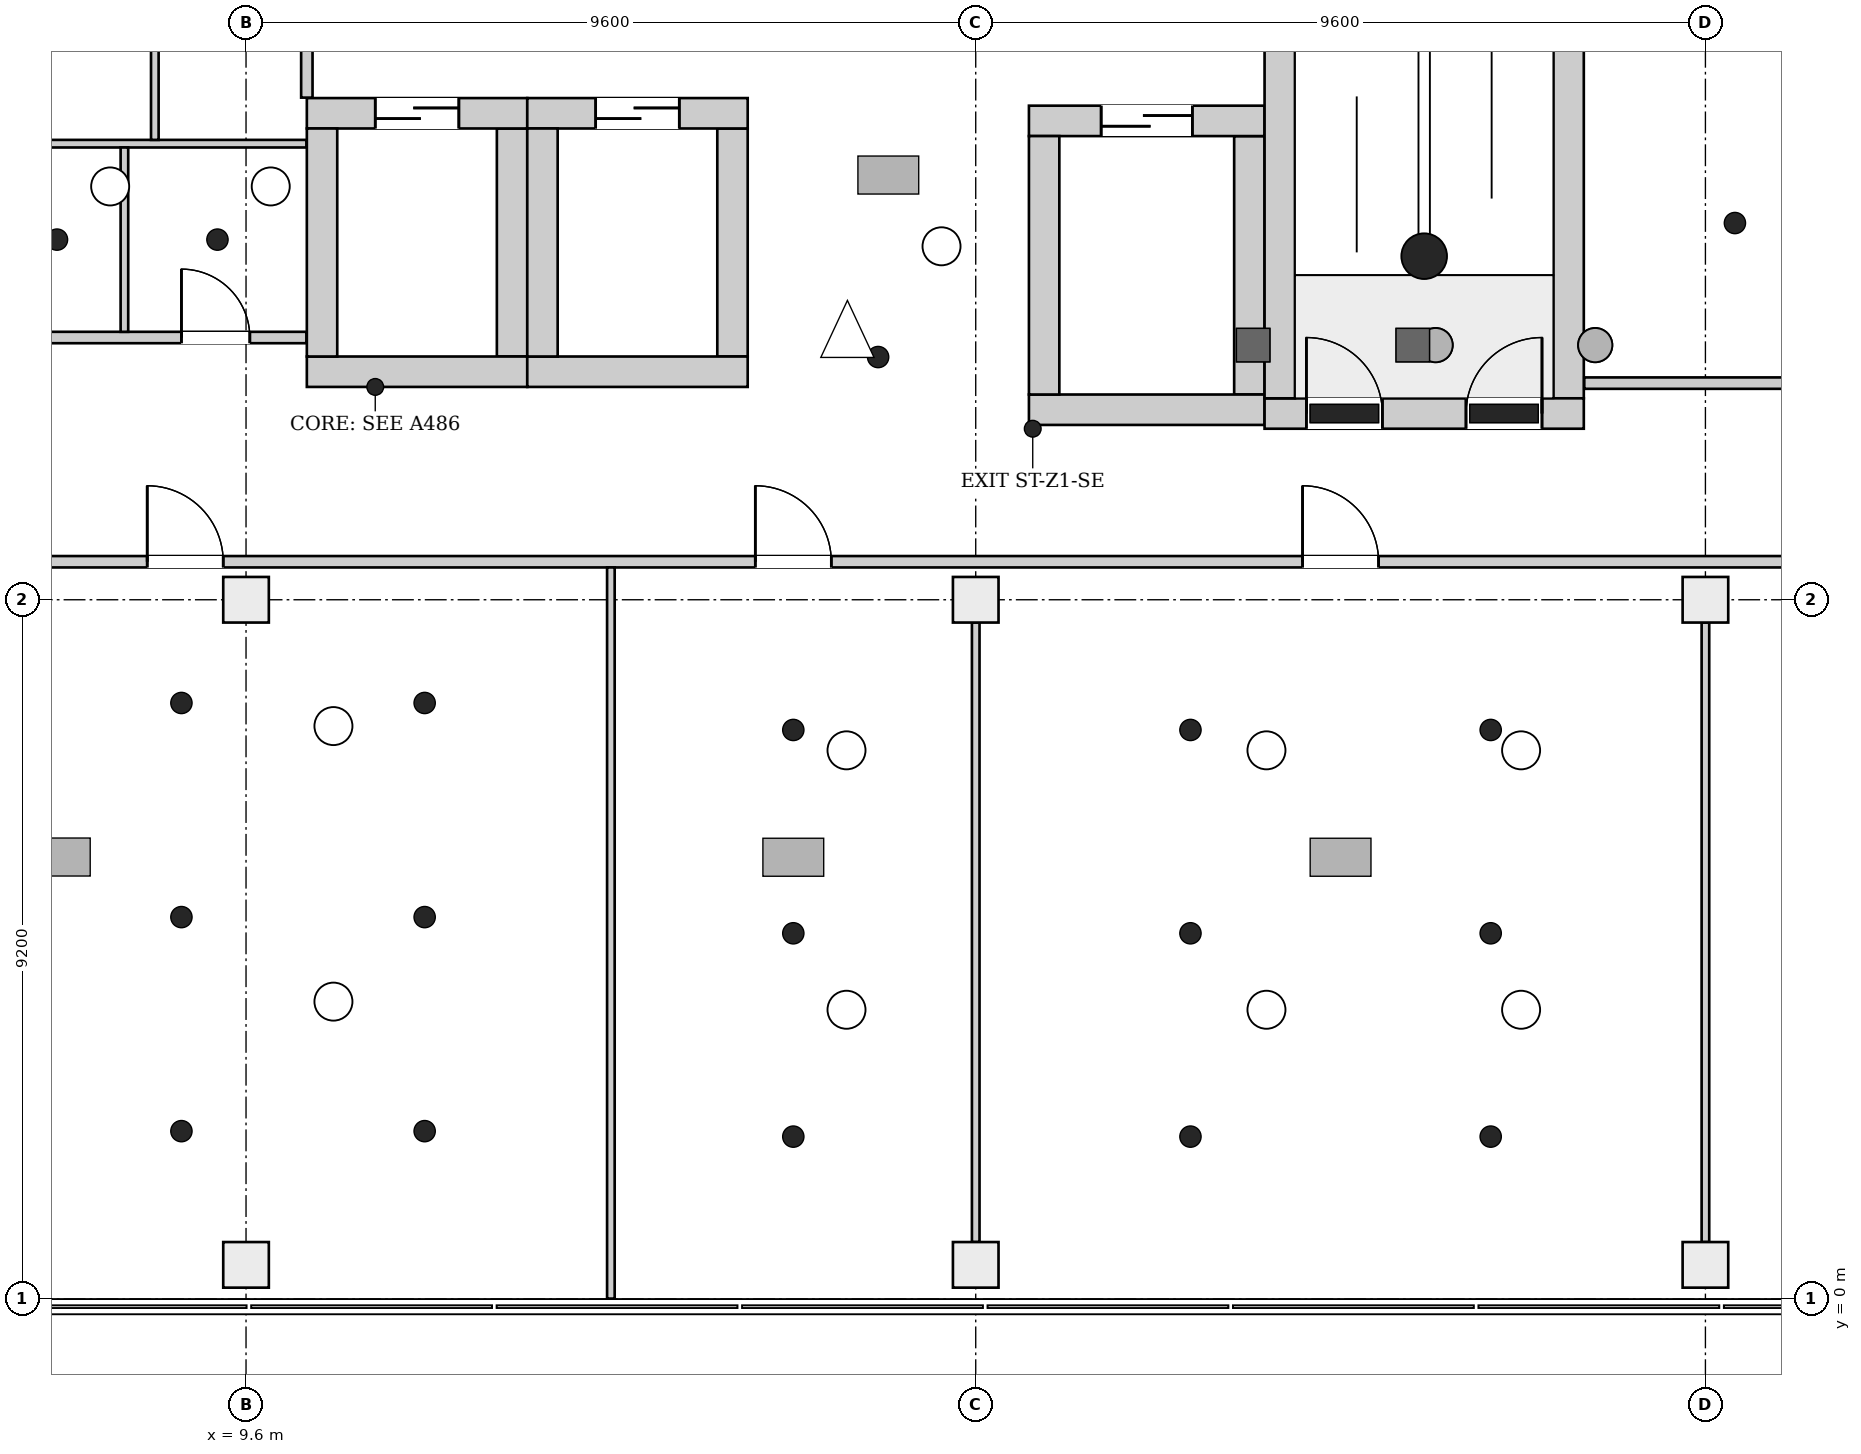
"""IFC4 building model, lengths in metres.
Left out: names, types, materials, properties, quantities, classifications, styles, units other than length and angle.
Written with IfcOpenShell. Run it as: python <this file> out.ifc"""

import sys

from ifc_helpers import new_model, si_unit, direction, frame, frame_2d, origin, origin_2d, place, context, subcontext, project, spatial, rectangle, extrude, element, fill, save


model = new_model("IFC4")
c1 = context("Model", 3, precision=1e-05, world=origin(), true_north=direction((0.0, 1.0)))
c2 = subcontext(c1, "Body", "Model", "MODEL_VIEW")
j1 = project(units=[si_unit("LENGTHUNIT", "METRE"), si_unit("PLANEANGLEUNIT", "RADIAN")], contexts=[c1])
p1 = place(None, origin())
s1 = spatial("IfcSite", under=j1, at=p1, CompositionType="ELEMENT")
p2 = place(p1, origin())
s2 = spatial("IfcBuilding", under=s1, at=p2, CompositionType="ELEMENT")
p3 = place(p2, frame((0.0, 0.0, 73.9)))
s3 = spatial("IfcBuildingStorey", under=s2, at=p3, CompositionType="ELEMENT", Elevation=73.9)
p4 = place(p3, frame((23.0, 11.65, 0.0), z_axis=(0.0, 0.0, 1.0), x_axis=(1.0, 0.0, 0.0)))
e1 = element("IfcWall", 1, at=p4, inside=s3, PredefinedType="SHEAR", context=c2, shape_type="SweptSolid", body=[
    extrude(rectangle(XDim=4.2, YDim=0.4, at=frame_2d((2.1, 0.0))), origin(), (0.0, 0.0, 1.0), 4.2),
])
p5 = place(p4, frame((0.55, 0.0, 0.0)))
e2 = element("IfcOpeningElement", 2, at=p5, cuts=e1, PredefinedType="OPENING", context=c2, shape_type="SweptSolid", body=[
    extrude(rectangle(XDim=1.0, YDim=2.1, at=frame_2d((0.5, 1.05))), frame((0.0, 0.21, 0.0), z_axis=(0.0, -1.0, 0.0), x_axis=(1.0, 0.0, 0.0)), (0.0, 0.0, 1.0), 0.42),
])
p6 = place(p4, frame((2.65, 0.0, 0.0)))
e3 = element("IfcOpeningElement", 3, at=p6, cuts=e1, PredefinedType="OPENING", context=c2, shape_type="SweptSolid", body=[
    extrude(rectangle(XDim=1.0, YDim=2.1, at=frame_2d((0.5, 1.05))), frame((0.0, 0.21, 0.0), z_axis=(0.0, -1.0, 0.0), x_axis=(1.0, 0.0, 0.0)), (0.0, 0.0, 1.0), 0.42),
])
for number, where, z_axis, x_axis in (
    (4, (23.2, 11.85, 0.0), (0.0, 0.0, 1.0), (0.0, 1.0, 0.0)),
    (5, (27.0, 11.85, 0.0), (0.0, 0.0, 1.0), (0.0, 1.0, 0.0)),
):
    element("IfcWall", number, at=place(p3, frame(where, z_axis=z_axis, x_axis=x_axis)), inside=s3, PredefinedType="SHEAR", context=c2, shape_type="SweptSolid", body=[
        extrude(rectangle(XDim=6.6, YDim=0.4, at=frame_2d((3.3, 0.0))), origin(), (0.0, 0.0, 1.0), 4.2),
    ])
p7 = place(p3, frame((10.4, 12.2, 0.0), z_axis=(0.0, 0.0, 1.0), x_axis=(1.0, 0.0, 0.0)))
e6 = element("IfcWall", 6, at=p7, inside=s3, PredefinedType="SHEAR", context=c2, shape_type="SweptSolid", body=[
    extrude(rectangle(XDim=2.9, YDim=0.4, at=frame_2d((1.45, 0.0))), origin(), (0.0, 0.0, 1.0), 4.2),
])
p8 = place(p3, frame((10.4, 15.6, 0.0), z_axis=(0.0, 0.0, 1.0), x_axis=(1.0, 0.0, 0.0)))
e7 = element("IfcWall", 7, at=p8, inside=s3, PredefinedType="SHEAR", context=c2, shape_type="SweptSolid", body=[
    extrude(rectangle(XDim=2.9, YDim=0.4, at=frame_2d((1.45, 0.0))), origin(), (0.0, 0.0, 1.0), 4.2),
])
p9 = place(p8, frame((0.9, 0.0, 0.0)))
e8 = element("IfcOpeningElement", 8, at=p9, cuts=e7, PredefinedType="OPENING", context=c2, shape_type="SweptSolid", body=[
    extrude(rectangle(XDim=1.1, YDim=2.1, at=frame_2d((0.55, 1.05))), frame((0.0, 0.21, 0.0), z_axis=(0.0, -1.0, 0.0), x_axis=(1.0, 0.0, 0.0)), (0.0, 0.0, 1.0), 0.42),
])
for number, where, z_axis, x_axis in (
    (9, (10.6, 12.4, 0.0), (0.0, 0.0, 1.0), (0.0, 1.0, 0.0)),
    (10, (13.1, 12.4, 0.0), (0.0, 0.0, 1.0), (0.0, 1.0, 0.0)),
):
    element("IfcWall", number, at=place(p3, frame(where, z_axis=z_axis, x_axis=x_axis)), inside=s3, PredefinedType="SHEAR", context=c2, shape_type="SweptSolid", body=[
        extrude(rectangle(XDim=3.0, YDim=0.4, at=frame_2d((1.5, 0.0))), origin(), (0.0, 0.0, 1.0), 4.2),
    ])
p10 = place(p3, frame((13.3, 12.2, 0.0), z_axis=(0.0, 0.0, 1.0), x_axis=(1.0, 0.0, 0.0)))
e11 = element("IfcWall", 11, at=p10, inside=s3, PredefinedType="SHEAR", context=c2, shape_type="SweptSolid", body=[
    extrude(rectangle(XDim=2.9, YDim=0.4, at=frame_2d((1.45, 0.0))), origin(), (0.0, 0.0, 1.0), 4.2),
])
p11 = place(p3, frame((13.3, 15.6, 0.0), z_axis=(0.0, 0.0, 1.0), x_axis=(1.0, 0.0, 0.0)))
e12 = element("IfcWall", 12, at=p11, inside=s3, PredefinedType="SHEAR", context=c2, shape_type="SweptSolid", body=[
    extrude(rectangle(XDim=2.9, YDim=0.4, at=frame_2d((1.45, 0.0))), origin(), (0.0, 0.0, 1.0), 4.2),
])
p12 = place(p11, frame((0.9, 0.0, 0.0)))
e13 = element("IfcOpeningElement", 13, at=p12, cuts=e12, PredefinedType="OPENING", context=c2, shape_type="SweptSolid", body=[
    extrude(rectangle(XDim=1.1, YDim=2.1, at=frame_2d((0.55, 1.05))), frame((0.0, 0.21, 0.0), z_axis=(0.0, -1.0, 0.0), x_axis=(1.0, 0.0, 0.0)), (0.0, 0.0, 1.0), 0.42),
])
for number, where, z_axis, x_axis in (
    (14, (13.5, 12.4, 0.0), (0.0, 0.0, 1.0), (0.0, 1.0, 0.0)),
    (15, (16.0, 12.4, 0.0), (0.0, 0.0, 1.0), (0.0, 1.0, 0.0)),
):
    element("IfcWall", number, at=place(p3, frame(where, z_axis=z_axis, x_axis=x_axis)), inside=s3, PredefinedType="SHEAR", context=c2, shape_type="SweptSolid", body=[
        extrude(rectangle(XDim=3.0, YDim=0.4, at=frame_2d((1.5, 0.0))), origin(), (0.0, 0.0, 1.0), 4.2),
    ])
p13 = place(p3, frame((19.9, 11.7, 0.0), z_axis=(0.0, 0.0, 1.0), x_axis=(1.0, 0.0, 0.0)))
e16 = element("IfcWall", 16, at=p13, inside=s3, PredefinedType="SHEAR", context=c2, shape_type="SweptSolid", body=[
    extrude(rectangle(XDim=3.1, YDim=0.4, at=frame_2d((1.55, 0.0))), origin(), (0.0, 0.0, 1.0), 4.2),
])
p14 = place(p3, frame((19.9, 15.5, 0.0), z_axis=(0.0, 0.0, 1.0), x_axis=(1.0, 0.0, 0.0)))
e17 = element("IfcWall", 17, at=p14, inside=s3, PredefinedType="SHEAR", context=c2, shape_type="SweptSolid", body=[
    extrude(rectangle(XDim=3.1, YDim=0.4, at=frame_2d((1.55, 0.0))), origin(), (0.0, 0.0, 1.0), 4.2),
])
p15 = place(p14, frame((0.95, 0.0, 0.0)))
e18 = element("IfcOpeningElement", 18, at=p15, cuts=e17, PredefinedType="OPENING", context=c2, shape_type="SweptSolid", body=[
    extrude(rectangle(XDim=1.2, YDim=2.1, at=frame_2d((0.6, 1.05))), frame((0.0, 0.21, 0.0), z_axis=(0.0, -1.0, 0.0), x_axis=(1.0, 0.0, 0.0)), (0.0, 0.0, 1.0), 0.42),
])
for number, where, z_axis, x_axis in (
    (19, (20.1, 11.9, 0.0), (0.0, 0.0, 1.0), (0.0, 1.0, 0.0)),
    (20, (22.8, 11.9, 0.0), (0.0, 0.0, 1.0), (0.0, 1.0, 0.0)),
):
    element("IfcWall", number, at=place(p3, frame(where, z_axis=z_axis, x_axis=x_axis)), inside=s3, PredefinedType="SHEAR", context=c2, shape_type="SweptSolid", body=[
        extrude(rectangle(XDim=3.4, YDim=0.4, at=frame_2d((1.7, 0.0))), origin(), (0.0, 0.0, 1.0), 4.2),
    ])
for number, where, z_axis, x_axis in (
    (21, (9.6, 0.45, 0.0), (0.0, 0.0, 1.0), (1.0, 0.0, 0.0)),
    (22, (19.2, 0.45, 0.0), (0.0, 0.0, 1.0), (1.0, 0.0, 0.0)),
    (23, (28.8, 0.45, 0.0), (0.0, 0.0, 1.0), (1.0, 0.0, 0.0)),
    (24, (9.6, 9.2, 0.0), (0.0, 0.0, 1.0), (1.0, 0.0, 0.0)),
    (25, (19.2, 9.2, 0.0), (0.0, 0.0, 1.0), (1.0, 0.0, 0.0)),
    (26, (28.8, 9.2, 0.0), (0.0, 0.0, 1.0), (1.0, 0.0, 0.0)),
):
    element("IfcColumn", number, at=place(p3, frame(where, z_axis=z_axis, x_axis=x_axis)), inside=s3, PredefinedType="COLUMN", context=c2, shape_type="SweptSolid", body=[
        extrude(rectangle(XDim=0.6, YDim=0.6, at=origin_2d()), origin(), (0.0, 0.0, 1.0), 4.2),
    ])
p16 = place(p3, frame((4.325, 9.7, 0.0), z_axis=(0.0, 0.0, 1.0), x_axis=(1.0, 0.0, 0.0)))
e27 = element("IfcWall", 27, at=p16, inside=s3, PredefinedType="PARTITIONING", context=c2, shape_type="SweptSolid", body=[
    extrude(rectangle(XDim=34.369, YDim=0.15, at=frame_2d((17.185, 0.0))), origin(), (0.0, 0.0, 1.0), 3.9),
])
p17 = place(p16, frame((3.975, 0.0, 0.0)))
e28 = element("IfcOpeningElement", 28, at=p17, cuts=e27, PredefinedType="OPENING", context=c2, shape_type="SweptSolid", body=[
    extrude(rectangle(XDim=1.0, YDim=2.1, at=frame_2d((0.5, 1.05))), frame((0.0, 0.085, 0.0), z_axis=(0.0, -1.0, 0.0), x_axis=(1.0, 0.0, 0.0)), (0.0, 0.0, 1.0), 0.17),
])
p18 = place(p16, frame((11.975, 0.0, 0.0)))
e29 = element("IfcOpeningElement", 29, at=p18, cuts=e27, PredefinedType="OPENING", context=c2, shape_type="SweptSolid", body=[
    extrude(rectangle(XDim=1.0, YDim=2.1, at=frame_2d((0.5, 1.05))), frame((0.0, 0.085, 0.0), z_axis=(0.0, -1.0, 0.0), x_axis=(1.0, 0.0, 0.0)), (0.0, 0.0, 1.0), 0.17),
])
p19 = place(p16, frame((19.175, 0.0, 0.0)))
e30 = element("IfcOpeningElement", 30, at=p19, cuts=e27, PredefinedType="OPENING", context=c2, shape_type="SweptSolid", body=[
    extrude(rectangle(XDim=1.0, YDim=2.1, at=frame_2d((0.5, 1.05))), frame((0.0, 0.085, 0.0), z_axis=(0.0, -1.0, 0.0), x_axis=(1.0, 0.0, 0.0)), (0.0, 0.0, 1.0), 0.17),
])
p20 = place(p16, frame((28.925, 0.0, 0.0)))
e31 = element("IfcOpeningElement", 31, at=p20, cuts=e27, PredefinedType="OPENING", context=c2, shape_type="SweptSolid", body=[
    extrude(rectangle(XDim=1.0, YDim=2.1, at=frame_2d((0.5, 1.05))), frame((0.0, 0.085, 0.0), z_axis=(0.0, -1.0, 0.0), x_axis=(1.0, 0.0, 0.0)), (0.0, 0.0, 1.0), 0.17),
])
p21 = place(p3, frame((6.125, 12.65, 0.0), z_axis=(0.0, 0.0, 1.0), x_axis=(1.0, 0.0, 0.0)))
e32 = element("IfcWall", 32, at=p21, inside=s3, PredefinedType="PARTITIONING", context=c2, shape_type="SweptSolid", body=[
    extrude(rectangle(XDim=4.269, YDim=0.15, at=frame_2d((2.135, 0.0))), origin(), (0.0, 0.0, 1.0), 3.9),
])
p22 = place(p21, frame((2.625, 0.0, 0.0)))
e33 = element("IfcOpeningElement", 33, at=p22, cuts=e32, PredefinedType="OPENING", context=c2, shape_type="SweptSolid", body=[
    extrude(rectangle(XDim=0.9, YDim=2.1, at=frame_2d((0.45, 1.05))), frame((0.0, 0.085, 0.0), z_axis=(0.0, -1.0, 0.0), x_axis=(1.0, 0.0, 0.0)), (0.0, 0.0, 1.0), 0.17),
])
p23 = place(p3, frame((6.275, 15.2, 0.0), z_axis=(0.0, 0.0, 1.0), x_axis=(1.0, 0.0, 0.0)))
e34 = element("IfcWall", 34, at=p23, inside=s3, PredefinedType="PARTITIONING", context=c2, shape_type="SweptSolid", body=[
    extrude(rectangle(XDim=4.119, YDim=0.1, at=frame_2d((2.06, 0.0))), origin(), (0.0, 0.0, 1.0), 3.9),
])
p24 = place(p3, frame((8.0, 12.725, 0.0), z_axis=(0.0, 0.0, 1.0), x_axis=(0.0, 1.0, 0.0)))
e35 = element("IfcWall", 35, at=p24, inside=s3, PredefinedType="PARTITIONING", context=c2, shape_type="SweptSolid", body=[
    extrude(rectangle(XDim=2.425, YDim=0.1, at=frame_2d((1.212, 0.0))), origin(), (0.0, 0.0, 1.0), 3.9),
])
p25 = place(p3, frame((8.4, 15.25, 0.0), z_axis=(0.0, 0.0, 1.0), x_axis=(0.0, 1.0, 0.0)))
e36 = element("IfcWall", 36, at=p25, inside=s3, PredefinedType="PARTITIONING", context=c2, shape_type="SweptSolid", body=[
    extrude(rectangle(XDim=3.394, YDim=0.1, at=frame_2d((1.697, 0.0))), origin(), (0.0, 0.0, 1.0), 3.9),
])
p26 = place(p3, frame((10.4, 15.806, 0.0), z_axis=(0.0, 0.0, 1.0), x_axis=(0.0, 1.0, 0.0)))
e37 = element("IfcWall", 37, at=p26, inside=s3, PredefinedType="PARTITIONING", context=c2, shape_type="SweptSolid", body=[
    extrude(rectangle(XDim=2.838, YDim=0.15, at=frame_2d((1.419, 0.0))), origin(), (0.0, 0.0, 1.0), 3.9),
])
p27 = place(p26, frame((1.074, 0.0, 0.0)))
e38 = element("IfcOpeningElement", 38, at=p27, cuts=e37, PredefinedType="OPENING", context=c2, shape_type="SweptSolid", body=[
    extrude(rectangle(XDim=0.7, YDim=2.1, at=frame_2d((0.35, 1.05))), frame((0.0, 0.085, 0.0), z_axis=(0.0, -1.0, 0.0), x_axis=(1.0, 0.0, 0.0)), (0.0, 0.0, 1.0), 0.17),
])
p28 = place(p3, frame((14.4, 0.006, 0.0), z_axis=(0.0, 0.0, 1.0), x_axis=(0.0, 1.0, 0.0)))
e39 = element("IfcWall", 39, at=p28, inside=s3, PredefinedType="PARTITIONING", context=c2, shape_type="SweptSolid", body=[
    extrude(rectangle(XDim=9.619, YDim=0.1, at=frame_2d((4.81, 0.0))), origin(), (0.0, 0.0, 1.0), 3.9),
])
p29 = place(p3, frame((19.2, 0.75, 0.0), z_axis=(0.0, 0.0, 1.0), x_axis=(0.0, 1.0, 0.0)))
e40 = element("IfcWall", 40, at=p29, inside=s3, PredefinedType="PARTITIONING", context=c2, shape_type="SweptSolid", body=[
    extrude(rectangle(XDim=8.15, YDim=0.1, at=frame_2d((4.075, 0.0))), origin(), (0.0, 0.0, 1.0), 3.9),
])
p30 = place(p3, frame((27.206, 12.05, 0.0), z_axis=(0.0, 0.0, 1.0), x_axis=(1.0, 0.0, 0.0)))
e41 = element("IfcWall", 41, at=p30, inside=s3, PredefinedType="PARTITIONING", context=c2, shape_type="SweptSolid", body=[
    extrude(rectangle(XDim=11.488, YDim=0.15, at=frame_2d((5.744, 0.0))), origin(), (0.0, 0.0, 1.0), 3.9),
])
p31 = place(p30, frame((2.694, 0.0, 0.0)))
e42 = element("IfcOpeningElement", 42, at=p31, cuts=e41, PredefinedType="OPENING", context=c2, shape_type="SweptSolid", body=[
    extrude(rectangle(XDim=1.0, YDim=2.1, at=frame_2d((0.5, 1.05))), frame((0.0, 0.085, 0.0), z_axis=(0.0, -1.0, 0.0), x_axis=(1.0, 0.0, 0.0)), (0.0, 0.0, 1.0), 0.17),
])
p32 = place(p30, frame((8.444, 0.0, 0.0)))
e43 = element("IfcOpeningElement", 43, at=p32, cuts=e41, PredefinedType="OPENING", context=c2, shape_type="SweptSolid", body=[
    extrude(rectangle(XDim=1.0, YDim=2.1, at=frame_2d((0.5, 1.05))), frame((0.0, 0.085, 0.0), z_axis=(0.0, -1.0, 0.0), x_axis=(1.0, 0.0, 0.0)), (0.0, 0.0, 1.0), 0.17),
])
p33 = place(p3, frame((28.8, 0.75, 0.0), z_axis=(0.0, 0.0, 1.0), x_axis=(0.0, 1.0, 0.0)))
e44 = element("IfcWall", 44, at=p33, inside=s3, PredefinedType="PARTITIONING", context=c2, shape_type="SweptSolid", body=[
    extrude(rectangle(XDim=8.15, YDim=0.1, at=frame_2d((4.075, 0.0))), origin(), (0.0, 0.0, 1.0), 3.9),
])
p34 = place(p5, origin())
e45 = element("IfcDoor", 45, at=p34, inside=s3, OperationType="SINGLE_SWING_RIGHT", PredefinedType="DOOR", context=c2, shape_type="SweptSolid", body=[
    extrude(rectangle(XDim=1.0, YDim=2.1, at=frame_2d((0.5, 1.05))), frame((0.0, 0.025, 0.0), z_axis=(0.0, -1.0, 0.0), x_axis=(1.0, 0.0, 0.0)), (0.0, 0.0, 1.0), 0.05),
])
fill(e2, e45)
p35 = place(p6, origin())
e46 = element("IfcDoor", 46, at=p35, inside=s3, OperationType="SINGLE_SWING_LEFT", PredefinedType="DOOR", context=c2, shape_type="SweptSolid", body=[
    extrude(rectangle(XDim=1.0, YDim=2.1, at=frame_2d((0.5, 1.05))), frame((0.0, 0.025, 0.0), z_axis=(0.0, -1.0, 0.0), x_axis=(1.0, 0.0, 0.0)), (0.0, 0.0, 1.0), 0.05),
])
fill(e3, e46)
p36 = place(p9, origin())
e47 = element("IfcDoor", 47, at=p36, inside=s3, OperationType="DOUBLE_DOOR_SLIDING", PredefinedType="DOOR", context=c2, shape_type="SweptSolid", body=[
    extrude(rectangle(XDim=1.1, YDim=2.1, at=frame_2d((0.55, 1.05))), frame((0.0, 0.025, 0.0), z_axis=(0.0, -1.0, 0.0), x_axis=(1.0, 0.0, 0.0)), (0.0, 0.0, 1.0), 0.05),
])
fill(e8, e47)
p37 = place(p12, origin())
e48 = element("IfcDoor", 48, at=p37, inside=s3, OperationType="DOUBLE_DOOR_SLIDING", PredefinedType="DOOR", context=c2, shape_type="SweptSolid", body=[
    extrude(rectangle(XDim=1.1, YDim=2.1, at=frame_2d((0.55, 1.05))), frame((0.0, 0.025, 0.0), z_axis=(0.0, -1.0, 0.0), x_axis=(1.0, 0.0, 0.0)), (0.0, 0.0, 1.0), 0.05),
])
fill(e13, e48)
p38 = place(p15, origin())
e49 = element("IfcDoor", 49, at=p38, inside=s3, OperationType="DOUBLE_DOOR_SLIDING", PredefinedType="DOOR", context=c2, shape_type="SweptSolid", body=[
    extrude(rectangle(XDim=1.2, YDim=2.1, at=frame_2d((0.6, 1.05))), frame((0.0, 0.025, 0.0), z_axis=(0.0, -1.0, 0.0), x_axis=(1.0, 0.0, 0.0)), (0.0, 0.0, 1.0), 0.05),
])
fill(e18, e49)
p39 = place(p22, origin())
e50 = element("IfcDoor", 50, at=p39, inside=s3, OperationType="SINGLE_SWING_RIGHT", PredefinedType="DOOR", context=c2, shape_type="SweptSolid", body=[
    extrude(rectangle(XDim=0.9, YDim=2.1, at=frame_2d((0.45, 1.05))), frame((0.0, 0.025, 0.0), z_axis=(0.0, -1.0, 0.0), x_axis=(1.0, 0.0, 0.0)), (0.0, 0.0, 1.0), 0.05),
])
fill(e33, e50)
p40 = place(p17, origin())
e51 = element("IfcDoor", 51, at=p40, inside=s3, OperationType="SINGLE_SWING_RIGHT", PredefinedType="DOOR", context=c2, shape_type="SweptSolid", body=[
    extrude(rectangle(XDim=1.0, YDim=2.1, at=frame_2d((0.5, 1.05))), frame((0.0, 0.025, 0.0), z_axis=(0.0, -1.0, 0.0), x_axis=(1.0, 0.0, 0.0)), (0.0, 0.0, 1.0), 0.05),
])
fill(e28, e51)
p41 = place(p18, origin())
e52 = element("IfcDoor", 52, at=p41, inside=s3, OperationType="SINGLE_SWING_RIGHT", PredefinedType="DOOR", context=c2, shape_type="SweptSolid", body=[
    extrude(rectangle(XDim=1.0, YDim=2.1, at=frame_2d((0.5, 1.05))), frame((0.0, 0.025, 0.0), z_axis=(0.0, -1.0, 0.0), x_axis=(1.0, 0.0, 0.0)), (0.0, 0.0, 1.0), 0.05),
])
fill(e29, e52)
p42 = place(p19, origin())
e53 = element("IfcDoor", 53, at=p42, inside=s3, OperationType="SINGLE_SWING_LEFT", PredefinedType="DOOR", context=c2, shape_type="SweptSolid", body=[
    extrude(rectangle(XDim=1.0, YDim=2.1, at=frame_2d((0.5, 1.05))), frame((0.0, 0.025, 0.0), z_axis=(0.0, -1.0, 0.0), x_axis=(1.0, 0.0, 0.0)), (0.0, 0.0, 1.0), 0.05),
])
fill(e30, e53)
save(model, sys.argv[1])
